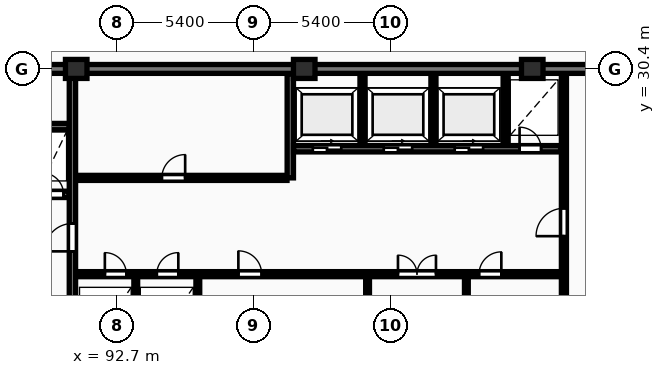
"""IFC4 building model, lengths in metres.
Left out: names, types, materials, properties, quantities, classifications, styles, units other than length and angle.
Written with IfcOpenShell. Run it as: python <this file> out.ifc"""

import sys

from ifc_helpers import new_model, si_unit, direction, frame, frame_2d, origin, origin_2d, place, context, subcontext, project, spatial, rectangle, extrude, element, fill, save


model = new_model("IFC4")
c1 = context("Model", 3, precision=1e-05, world=origin(), true_north=direction((0.0, 1.0)))
c2 = subcontext(c1, "Body", "Model", "MODEL_VIEW")
j1 = project(units=[si_unit("LENGTHUNIT", "METRE"), si_unit("PLANEANGLEUNIT", "RADIAN")], contexts=[c1])
p1 = place(None, origin())
s1 = spatial("IfcSite", under=j1, at=p1, CompositionType="ELEMENT")
p2 = place(p1, origin())
s2 = spatial("IfcBuilding", under=s1, at=p2, CompositionType="ELEMENT")
p3 = place(p2, frame((0.0, 0.0, 100.3)))
s3 = spatial("IfcBuildingStorey", under=s2, at=p3, CompositionType="ELEMENT", Elevation=100.3)
for number, where, z_axis, x_axis in (
    (1, (91.1, 30.4, 0.0), (0.0, 0.0, 1.0), (1.0, 0.0, 0.0)),
    (2, (100.1, 30.4, 0.0), (0.0, 0.0, 1.0), (1.0, 0.0, 0.0)),
    (3, (109.1, 30.4, 0.0), (0.0, 0.0, 1.0), (1.0, 0.0, 0.0)),
):
    element("IfcColumn", number, at=place(p3, frame(where, z_axis=z_axis, x_axis=x_axis)), inside=s3, PredefinedType="COLUMN", context=c2, shape_type="SweptSolid", body=[
        extrude(rectangle(XDim=0.85, YDim=0.75, at=origin_2d()), origin(), (0.0, 0.0, 1.0), 3.25),
    ])
p4 = place(p3, frame((81.925, 30.4, 0.0), z_axis=(0.0, 0.0, 1.0), x_axis=(1.0, 0.0, 0.0)))
e4 = element("IfcWall", 4, at=p4, inside=s3, PredefinedType="SHEAR", context=c2, shape_type="SweptSolid", body=[
    extrude(rectangle(XDim=36.265, YDim=0.35, at=frame_2d((18.132, 0.0))), origin(), (0.0, 0.0, 1.0), 3.25),
])
p5 = place(p3, frame((83.0, 28.125, 0.0), z_axis=(0.0, 0.0, 1.0), x_axis=(1.0, 0.0, 0.0)))
e5 = element("IfcWall", 5, at=p5, inside=s3, PredefinedType="SHEAR", context=c2, shape_type="SweptSolid", body=[
    extrude(rectangle(XDim=7.82, YDim=0.25, at=frame_2d((3.91, 0.0))), origin(), (0.0, 0.0, 1.0), 3.25),
])
p6 = place(p3, frame((86.5, 25.45, 0.0), z_axis=(0.0, 0.0, 1.0), x_axis=(1.0, 0.0, 0.0)))
e6 = element("IfcWall", 6, at=p6, inside=s3, PredefinedType="SHEAR", context=c2, shape_type="SweptSolid", body=[
    extrude(rectangle(XDim=4.32, YDim=0.25, at=frame_2d((2.16, 0.0))), origin(), (0.0, 0.0, 1.0), 3.25),
])
p7 = place(p6, frame((1.14, 0.0, 0.0)))
e7 = element("IfcOpeningElement", 7, at=p7, cuts=e6, PredefinedType="OPENING", context=c2, shape_type="SweptSolid", body=[
    extrude(rectangle(XDim=1.12, YDim=2.12, at=frame_2d((0.56, 1.06))), frame((0.0, 0.135, 0.0), z_axis=(0.0, -1.0, 0.0), x_axis=(1.0, 0.0, 0.0)), (0.0, 0.0, 1.0), 0.27),
])
p8 = place(p6, frame((3.25, 0.0, 0.0)))
e8 = element("IfcOpeningElement", 8, at=p8, cuts=e6, PredefinedType="OPENING", context=c2, shape_type="SweptSolid", body=[
    extrude(rectangle(XDim=0.85, YDim=2.05, at=frame_2d((0.425, 1.025))), frame((0.0, 0.135, 0.0), z_axis=(0.0, -1.0, 0.0), x_axis=(1.0, 0.0, 0.0)), (0.0, 0.0, 1.0), 0.27),
])
p9 = place(p3, frame((90.95, 18.6, 0.0), z_axis=(0.0, 0.0, 1.0), x_axis=(0.0, 1.0, 0.0)))
e9 = element("IfcWall", 9, at=p9, inside=s3, PredefinedType="SHEAR", context=c2, shape_type="SweptSolid", body=[
    extrude(rectangle(XDim=11.6, YDim=0.25, at=frame_2d((5.8, 0.0))), origin(), (0.0, 0.0, 1.0), 3.25),
])
p10 = place(p9, frame((4.6, 0.0, 0.0)))
e10 = element("IfcOpeningElement", 10, at=p10, cuts=e9, PredefinedType="OPENING", context=c2, shape_type="SweptSolid", body=[
    extrude(rectangle(XDim=1.1, YDim=2.1, at=frame_2d((0.55, 1.05))), frame((0.0, 0.135, 0.0), z_axis=(0.0, -1.0, 0.0), x_axis=(1.0, 0.0, 0.0)), (0.0, 0.0, 1.0), 0.27),
])
p11 = place(p3, frame((91.08, 26.1, 0.0), z_axis=(0.0, 0.0, 1.0), x_axis=(1.0, 0.0, 0.0)))
e11 = element("IfcWall", 11, at=p11, inside=s3, PredefinedType="PARTITIONING", context=c2, shape_type="SweptSolid", body=[
    extrude(rectangle(XDim=8.34, YDim=0.2, at=frame_2d((4.17, 0.0))), origin(), (0.0, 0.0, 1.0), 2.97),
])
p12 = place(p11, frame((3.4, 0.0, 0.0)))
e12 = element("IfcOpeningElement", 12, at=p12, cuts=e11, PredefinedType="OPENING", context=c2, shape_type="SweptSolid", body=[
    extrude(rectangle(XDim=0.92, YDim=2.08, at=frame_2d((0.46, 1.04))), frame((0.0, 0.11, 0.0), z_axis=(0.0, -1.0, 0.0), x_axis=(1.0, 0.0, 0.0)), (0.0, 0.0, 1.0), 0.22),
])
p13 = place(p3, frame((99.55, 26.1, 0.0), z_axis=(0.0, 0.0, 1.0), x_axis=(0.0, 1.0, 0.0)))
e13 = element("IfcWall", 13, at=p13, inside=s3, PredefinedType="SHEAR", context=c2, shape_type="SweptSolid", body=[
    extrude(rectangle(XDim=4.1, YDim=0.25, at=frame_2d((2.05, 0.0))), origin(), (0.0, 0.0, 1.0), 3.25),
])
for number, where, z_axis, x_axis in (
    (14, (102.4, 27.38, 0.0), (0.0, 0.0, 1.0), (0.0, 1.0, 0.0)),
    (15, (105.2, 27.38, 0.0), (0.0, 0.0, 1.0), (0.0, 1.0, 0.0)),
    (16, (108.05, 27.38, 0.0), (0.0, 0.0, 1.0), (0.0, 1.0, 0.0)),
):
    element("IfcWall", number, at=place(p3, frame(where, z_axis=z_axis, x_axis=x_axis)), inside=s3, PredefinedType="PARTITIONING", context=c2, shape_type="SweptSolid", body=[
        extrude(rectangle(XDim=2.82, YDim=0.2, at=frame_2d((1.41, 0.0))), origin(), (0.0, 0.0, 1.0), 2.97),
    ])
p14 = place(p3, frame((99.68, 27.25, 0.0), z_axis=(0.0, 0.0, 1.0), x_axis=(1.0, 0.0, 0.0)))
e17 = element("IfcWall", 17, at=p14, inside=s3, PredefinedType="SHEAR", context=c2, shape_type="SweptSolid", body=[
    extrude(rectangle(XDim=10.54, YDim=0.25, at=frame_2d((5.27, 0.0))), origin(), (0.0, 0.0, 1.0), 3.25),
])
p15 = place(p14, frame((0.76, 0.0, 0.0)))
e18 = element("IfcOpeningElement", 18, at=p15, cuts=e17, PredefinedType="OPENING", context=c2, shape_type="SweptSolid", body=[
    extrude(rectangle(XDim=1.12, YDim=2.12, at=frame_2d((0.56, 1.06))), frame((0.0, 0.135, 0.0), z_axis=(0.0, -1.0, 0.0), x_axis=(1.0, 0.0, 0.0)), (0.0, 0.0, 1.0), 0.27),
])
p16 = place(p14, frame((3.56, 0.0, 0.0)))
e19 = element("IfcOpeningElement", 19, at=p16, cuts=e17, PredefinedType="OPENING", context=c2, shape_type="SweptSolid", body=[
    extrude(rectangle(XDim=1.12, YDim=2.12, at=frame_2d((0.56, 1.06))), frame((0.0, 0.135, 0.0), z_axis=(0.0, -1.0, 0.0), x_axis=(1.0, 0.0, 0.0)), (0.0, 0.0, 1.0), 0.27),
])
p17 = place(p14, frame((6.36, 0.0, 0.0)))
e20 = element("IfcOpeningElement", 20, at=p17, cuts=e17, PredefinedType="OPENING", context=c2, shape_type="SweptSolid", body=[
    extrude(rectangle(XDim=1.12, YDim=2.12, at=frame_2d((0.56, 1.06))), frame((0.0, 0.135, 0.0), z_axis=(0.0, -1.0, 0.0), x_axis=(1.0, 0.0, 0.0)), (0.0, 0.0, 1.0), 0.27),
])
p18 = place(p14, frame((8.92, 0.0, 0.0)))
e21 = element("IfcOpeningElement", 21, at=p18, cuts=e17, PredefinedType="OPENING", context=c2, shape_type="SweptSolid", body=[
    extrude(rectangle(XDim=0.85, YDim=2.05, at=frame_2d((0.425, 1.025))), frame((0.0, 0.135, 0.0), z_axis=(0.0, -1.0, 0.0), x_axis=(1.0, 0.0, 0.0)), (0.0, 0.0, 1.0), 0.27),
])
for number, where, z_axis, x_axis in (
    (22, (93.45, 18.6, 0.0), (0.0, 0.0, 1.0), (0.0, 1.0, 0.0)),
    (23, (95.9, 18.6, 0.0), (0.0, 0.0, 1.0), (0.0, 1.0, 0.0)),
    (24, (102.6, 18.6, 0.0), (0.0, 0.0, 1.0), (0.0, 1.0, 0.0)),
    (25, (106.5, 18.6, 0.0), (0.0, 0.0, 1.0), (0.0, 1.0, 0.0)),
):
    element("IfcWall", number, at=place(p3, frame(where, z_axis=z_axis, x_axis=x_axis)), inside=s3, PredefinedType="PARTITIONING", context=c2, shape_type="SweptSolid", body=[
        extrude(rectangle(XDim=3.6, YDim=0.15, at=frame_2d((1.8, 0.0))), origin(), (0.0, 0.0, 1.0), 2.97),
    ])
p19 = place(p3, frame((91.08, 22.3, 0.0), z_axis=(0.0, 0.0, 1.0), x_axis=(1.0, 0.0, 0.0)))
e26 = element("IfcWall", 26, at=p19, inside=s3, PredefinedType="PARTITIONING", context=c2, shape_type="SweptSolid", body=[
    extrude(rectangle(XDim=19.14, YDim=0.2, at=frame_2d((9.57, 0.0))), origin(), (0.0, 0.0, 1.0), 2.97),
])
p20 = place(p19, frame((1.15, 0.0, 0.0)))
e27 = element("IfcOpeningElement", 27, at=p20, cuts=e26, PredefinedType="OPENING", context=c2, shape_type="SweptSolid", body=[
    extrude(rectangle(XDim=0.85, YDim=2.05, at=frame_2d((0.425, 1.025))), frame((0.0, 0.11, 0.0), z_axis=(0.0, -1.0, 0.0), x_axis=(1.0, 0.0, 0.0)), (0.0, 0.0, 1.0), 0.22),
])
p21 = place(p19, frame((3.2, 0.0, 0.0)))
e28 = element("IfcOpeningElement", 28, at=p21, cuts=e26, PredefinedType="OPENING", context=c2, shape_type="SweptSolid", body=[
    extrude(rectangle(XDim=0.85, YDim=2.05, at=frame_2d((0.425, 1.025))), frame((0.0, 0.11, 0.0), z_axis=(0.0, -1.0, 0.0), x_axis=(1.0, 0.0, 0.0)), (0.0, 0.0, 1.0), 0.22),
])
p22 = place(p19, frame((12.72, 0.0, 0.0)))
e29 = element("IfcOpeningElement", 29, at=p22, cuts=e26, PredefinedType="OPENING", context=c2, shape_type="SweptSolid", body=[
    extrude(rectangle(XDim=1.5, YDim=2.2, at=frame_2d((0.75, 1.1))), frame((0.0, 0.11, 0.0), z_axis=(0.0, -1.0, 0.0), x_axis=(1.0, 0.0, 0.0)), (0.0, 0.0, 1.0), 0.22),
])
p23 = place(p19, frame((6.42, 0.0, 0.0)))
e30 = element("IfcOpeningElement", 30, at=p23, cuts=e26, PredefinedType="OPENING", context=c2, shape_type="SweptSolid", body=[
    extrude(rectangle(XDim=0.92, YDim=2.08, at=frame_2d((0.46, 1.04))), frame((0.0, 0.11, 0.0), z_axis=(0.0, -1.0, 0.0), x_axis=(1.0, 0.0, 0.0)), (0.0, 0.0, 1.0), 0.22),
])
p24 = place(p19, frame((15.92, 0.0, 0.0)))
e31 = element("IfcOpeningElement", 31, at=p24, cuts=e26, PredefinedType="OPENING", context=c2, shape_type="SweptSolid", body=[
    extrude(rectangle(XDim=0.88, YDim=2.06, at=frame_2d((0.44, 1.03))), frame((0.0, 0.11, 0.0), z_axis=(0.0, -1.0, 0.0), x_axis=(1.0, 0.0, 0.0)), (0.0, 0.0, 1.0), 0.22),
])
p25 = place(p3, frame((110.35, 18.6, 0.0), z_axis=(0.0, 0.0, 1.0), x_axis=(0.0, 1.0, 0.0)))
e32 = element("IfcWall", 32, at=p25, inside=s3, PredefinedType="PARTITIONING", context=c2, shape_type="SweptSolid", body=[
    extrude(rectangle(XDim=11.6, YDim=0.2, at=frame_2d((5.8, 0.0))), origin(), (0.0, 0.0, 1.0), 2.97),
])
p26 = place(p25, frame((5.2, 0.0, 0.0)))
e33 = element("IfcOpeningElement", 33, at=p26, cuts=e32, PredefinedType="OPENING", context=c2, shape_type="SweptSolid", body=[
    extrude(rectangle(XDim=1.1, YDim=2.15, at=frame_2d((0.55, 1.075))), frame((0.0, 0.11, 0.0), z_axis=(0.0, -1.0, 0.0), x_axis=(1.0, 0.0, 0.0)), (0.0, 0.0, 1.0), 0.22),
])
p27 = place(p8, origin())
e34 = element("IfcDoor", 34, at=p27, inside=s3, OperationType="SINGLE_SWING_LEFT", PredefinedType="DOOR", context=c2, shape_type="SweptSolid", body=[
    extrude(rectangle(XDim=0.85, YDim=2.05, at=frame_2d((0.425, 1.025))), frame((0.0, 0.025, 0.0), z_axis=(0.0, -1.0, 0.0), x_axis=(1.0, 0.0, 0.0)), (0.0, 0.0, 1.0), 0.05),
])
fill(e8, e34)
p28 = place(p10, origin())
e35 = element("IfcDoor", 35, at=p28, inside=s3, OperationType="SINGLE_SWING_LEFT", PredefinedType="DOOR", context=c2, shape_type="SweptSolid", body=[
    extrude(rectangle(XDim=1.1, YDim=2.1, at=frame_2d((0.55, 1.05))), frame((0.0, 0.025, 0.0), z_axis=(0.0, -1.0, 0.0), x_axis=(1.0, 0.0, 0.0)), (0.0, 0.0, 1.0), 0.05),
])
fill(e10, e35)
p29 = place(p12, origin())
e36 = element("IfcDoor", 36, at=p29, inside=s3, OperationType="SINGLE_SWING_RIGHT", PredefinedType="DOOR", context=c2, shape_type="SweptSolid", body=[
    extrude(rectangle(XDim=0.92, YDim=2.08, at=frame_2d((0.46, 1.04))), frame((0.0, 0.025, 0.0), z_axis=(0.0, -1.0, 0.0), x_axis=(1.0, 0.0, 0.0)), (0.0, 0.0, 1.0), 0.05),
])
fill(e12, e36)
p30 = place(p15, origin())
e37 = element("IfcDoor", 37, at=p30, inside=s3, OperationType="SLIDING_TO_RIGHT", PredefinedType="DOOR", context=c2, shape_type="SweptSolid", body=[
    extrude(rectangle(XDim=1.12, YDim=2.12, at=frame_2d((0.56, 1.06))), frame((0.0, 0.025, 0.0), z_axis=(0.0, -1.0, 0.0), x_axis=(1.0, 0.0, 0.0)), (0.0, 0.0, 1.0), 0.05),
])
fill(e18, e37)
p31 = place(p16, origin())
e38 = element("IfcDoor", 38, at=p31, inside=s3, OperationType="SLIDING_TO_RIGHT", PredefinedType="DOOR", context=c2, shape_type="SweptSolid", body=[
    extrude(rectangle(XDim=1.12, YDim=2.12, at=frame_2d((0.56, 1.06))), frame((0.0, 0.025, 0.0), z_axis=(0.0, -1.0, 0.0), x_axis=(1.0, 0.0, 0.0)), (0.0, 0.0, 1.0), 0.05),
])
fill(e19, e38)
p32 = place(p17, origin())
e39 = element("IfcDoor", 39, at=p32, inside=s3, OperationType="SLIDING_TO_RIGHT", PredefinedType="DOOR", context=c2, shape_type="SweptSolid", body=[
    extrude(rectangle(XDim=1.12, YDim=2.12, at=frame_2d((0.56, 1.06))), frame((0.0, 0.025, 0.0), z_axis=(0.0, -1.0, 0.0), x_axis=(1.0, 0.0, 0.0)), (0.0, 0.0, 1.0), 0.05),
])
fill(e20, e39)
p33 = place(p18, origin())
e40 = element("IfcDoor", 40, at=p33, inside=s3, OperationType="SINGLE_SWING_LEFT", PredefinedType="DOOR", context=c2, shape_type="SweptSolid", body=[
    extrude(rectangle(XDim=0.85, YDim=2.05, at=frame_2d((0.425, 1.025))), frame((0.0, 0.025, 0.0), z_axis=(0.0, -1.0, 0.0), x_axis=(1.0, 0.0, 0.0)), (0.0, 0.0, 1.0), 0.05),
])
fill(e21, e40)
p34 = place(p20, origin())
e41 = element("IfcDoor", 41, at=p34, inside=s3, OperationType="SINGLE_SWING_LEFT", PredefinedType="DOOR", context=c2, shape_type="SweptSolid", body=[
    extrude(rectangle(XDim=0.85, YDim=2.05, at=frame_2d((0.425, 1.025))), frame((0.0, 0.025, 0.0), z_axis=(0.0, -1.0, 0.0), x_axis=(1.0, 0.0, 0.0)), (0.0, 0.0, 1.0), 0.05),
])
fill(e27, e41)
p35 = place(p21, origin())
e42 = element("IfcDoor", 42, at=p35, inside=s3, OperationType="SINGLE_SWING_RIGHT", PredefinedType="DOOR", context=c2, shape_type="SweptSolid", body=[
    extrude(rectangle(XDim=0.85, YDim=2.05, at=frame_2d((0.425, 1.025))), frame((0.0, 0.025, 0.0), z_axis=(0.0, -1.0, 0.0), x_axis=(1.0, 0.0, 0.0)), (0.0, 0.0, 1.0), 0.05),
])
fill(e28, e42)
p36 = place(p22, origin())
e43 = element("IfcDoor", 43, at=p36, inside=s3, OperationType="DOUBLE_DOOR_SINGLE_SWING", PredefinedType="DOOR", context=c2, shape_type="SweptSolid", body=[
    extrude(rectangle(XDim=1.5, YDim=2.2, at=frame_2d((0.75, 1.1))), frame((0.0, 0.025, 0.0), z_axis=(0.0, -1.0, 0.0), x_axis=(1.0, 0.0, 0.0)), (0.0, 0.0, 1.0), 0.05),
])
fill(e29, e43)
p37 = place(p23, origin())
e44 = element("IfcDoor", 44, at=p37, inside=s3, OperationType="SINGLE_SWING_LEFT", PredefinedType="DOOR", context=c2, shape_type="SweptSolid", body=[
    extrude(rectangle(XDim=0.92, YDim=2.08, at=frame_2d((0.46, 1.04))), frame((0.0, 0.025, 0.0), z_axis=(0.0, -1.0, 0.0), x_axis=(1.0, 0.0, 0.0)), (0.0, 0.0, 1.0), 0.05),
])
fill(e30, e44)
p38 = place(p24, origin())
e45 = element("IfcDoor", 45, at=p38, inside=s3, OperationType="SINGLE_SWING_RIGHT", PredefinedType="DOOR", context=c2, shape_type="SweptSolid", body=[
    extrude(rectangle(XDim=0.88, YDim=2.06, at=frame_2d((0.44, 1.03))), frame((0.0, 0.025, 0.0), z_axis=(0.0, -1.0, 0.0), x_axis=(1.0, 0.0, 0.0)), (0.0, 0.0, 1.0), 0.05),
])
fill(e31, e45)
p39 = place(p26, origin())
e46 = element("IfcDoor", 46, at=p39, inside=s3, OperationType="SINGLE_SWING_LEFT", PredefinedType="DOOR", context=c2, shape_type="SweptSolid", body=[
    extrude(rectangle(XDim=1.1, YDim=2.15, at=frame_2d((0.55, 1.075))), frame((0.0, 0.025, 0.0), z_axis=(0.0, -1.0, 0.0), x_axis=(1.0, 0.0, 0.0)), (0.0, 0.0, 1.0), 0.05),
])
fill(e33, e46)
save(model, sys.argv[1])
